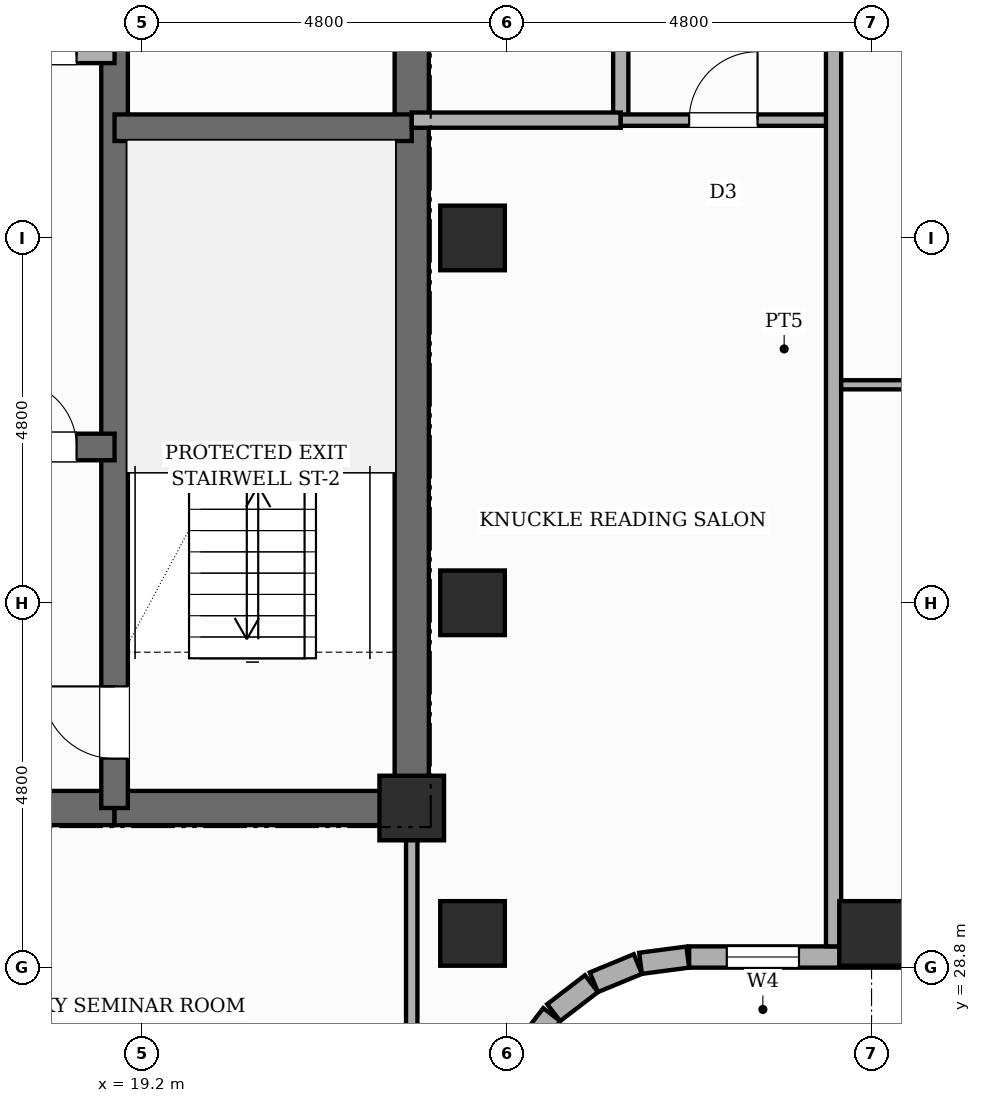
"""IFC4 building model, lengths in metres.
Left out: names, types, materials, properties, quantities, classifications, styles, units other than length and angle.
Written with IfcOpenShell. Run it as: python <this file> out.ifc"""

import sys

from ifc_helpers import new_model, si_unit, direction, frame, frame_2d, origin, origin_2d, place, context, subcontext, project, spatial, rectangle, extrude, element, fill, save


model = new_model("IFC4")
c1 = context("Model", 3, precision=1e-05, world=origin(), true_north=direction((0.0, 1.0)))
c2 = subcontext(c1, "Body", "Model", "MODEL_VIEW")
j1 = project(units=[si_unit("LENGTHUNIT", "METRE"), si_unit("PLANEANGLEUNIT", "RADIAN")], contexts=[c1])
p1 = place(None, origin())
s1 = spatial("IfcSite", under=j1, at=p1, CompositionType="ELEMENT")
p2 = place(p1, origin())
s2 = spatial("IfcBuilding", under=s1, at=p2, CompositionType="ELEMENT")
p3 = place(p2, frame((0.0, 0.0, 236.2)))
s3 = spatial("IfcBuildingStorey", under=s2, at=p3, CompositionType="ELEMENT", Elevation=236.2)
p4 = place(p3, frame((22.75, 30.675, 0.0), z_axis=(0.0, 0.0, 1.0), x_axis=(0.0, 1.0, 0.0)))
e1 = element("IfcWall", 1, at=p4, inside=s3, PredefinedType="SHEAR", context=c2, shape_type="SweptSolid", body=[
    extrude(rectangle(XDim=15.35, YDim=0.45, at=frame_2d((7.675, 0.0))), origin(), (0.0, 0.0, 1.0), 3.6),
])
p5 = place(p4, frame((10.675, 0.0, 0.0)))
e2 = element("IfcOpeningElement", 2, at=p5, cuts=e1, PredefinedType="OPENING", context=c2, shape_type="SweptSolid", body=[
    extrude(rectangle(XDim=1.0, YDim=2.15, at=frame_2d((0.5, 1.075))), frame((0.0, 0.235, 0.0), z_axis=(0.0, -1.0, 0.0), x_axis=(1.0, 0.0, 0.0)), (0.0, 0.0, 1.0), 0.47),
])
p6 = place(p3, frame((9.96, 30.9, 0.0), z_axis=(0.0, 0.0, 1.0), x_axis=(1.0, 0.0, 0.0)))
e3 = element("IfcWall", 3, at=p6, inside=s3, PredefinedType="SHEAR", context=c2, shape_type="SweptSolid", body=[
    extrude(rectangle(XDim=8.88, YDim=0.45, at=frame_2d((4.44, 0.0))), origin(), (0.0, 0.0, 1.0), 3.6),
])
p7 = place(p6, frame((4.09, 0.0, 0.0)))
e4 = element("IfcOpeningElement", 4, at=p7, cuts=e3, PredefinedType="OPENING", context=c2, shape_type="SweptSolid", body=[
    extrude(rectangle(XDim=1.0, YDim=2.15, at=frame_2d((0.5, 1.075))), frame((0.0, 0.235, 0.0), z_axis=(0.0, -1.0, 0.0), x_axis=(1.0, 0.0, 0.0)), (0.0, 0.0, 1.0), 0.47),
])
p8 = place(p3, frame((18.84, 30.9, 0.0), z_axis=(0.0, 0.0, 1.0), x_axis=(1.0, 0.0, 0.0)))
e5 = element("IfcWall", 5, at=p8, inside=s3, PredefinedType="SHEAR", context=c2, shape_type="SweptSolid", body=[
    extrude(rectangle(XDim=3.91, YDim=0.45, at=frame_2d((1.955, 0.0))), origin(), (0.0, 0.0, 1.0), 3.6),
])
p9 = place(p3, frame((18.84, 30.9, 0.0), z_axis=(0.0, 0.0, 1.0), x_axis=(0.0, 1.0, 0.0)))
e6 = element("IfcWall", 6, at=p9, inside=s3, PredefinedType="SHEAR", context=c2, shape_type="SweptSolid", body=[
    extrude(rectangle(XDim=14.9, YDim=0.35, at=frame_2d((7.45, 0.0))), origin(), (0.0, 0.0, 1.0), 3.6),
])
p10 = place(p9, frame((0.65, 0.0, 0.0)))
e7 = element("IfcOpeningElement", 7, at=p10, cuts=e6, PredefinedType="OPENING", context=c2, shape_type="SweptSolid", body=[
    extrude(rectangle(XDim=0.95, YDim=2.1, at=frame_2d((0.475, 1.05))), frame((0.0, 0.185, 0.0), z_axis=(0.0, -1.0, 0.0), x_axis=(1.0, 0.0, 0.0)), (0.0, 0.0, 1.0), 0.37),
])
p11 = place(p9, frame((10.45, 0.0, 0.0)))
e8 = element("IfcOpeningElement", 8, at=p11, cuts=e6, PredefinedType="OPENING", context=c2, shape_type="SweptSolid", body=[
    extrude(rectangle(XDim=1.0, YDim=2.15, at=frame_2d((0.5, 1.075))), frame((0.0, 0.185, 0.0), z_axis=(0.0, -1.0, 0.0), x_axis=(1.0, 0.0, 0.0)), (0.0, 0.0, 1.0), 0.37),
])
p12 = place(p3, frame((18.84, 39.85, 0.0), z_axis=(0.0, 0.0, 1.0), x_axis=(1.0, 0.0, 0.0)))
e9 = element("IfcWall", 9, at=p12, inside=s3, PredefinedType="SHEAR", context=c2, shape_type="SweptSolid", body=[
    extrude(rectangle(XDim=3.91, YDim=0.35, at=frame_2d((1.955, 0.0))), origin(), (0.0, 0.0, 1.0), 3.6),
])
p13 = place(p3, frame((9.96, 35.65, 0.0), z_axis=(0.0, 0.0, 1.0), x_axis=(1.0, 0.0, 0.0)))
e10 = element("IfcWall", 10, at=p13, inside=s3, PredefinedType="SHEAR", context=c2, shape_type="SweptSolid", body=[
    extrude(rectangle(XDim=8.88, YDim=0.35, at=frame_2d((4.44, 0.0))), origin(), (0.0, 0.0, 1.0), 3.6),
])
p14 = place(p13, frame((0.84, 0.0, 0.0)))
e11 = element("IfcOpeningElement", 11, at=p14, cuts=e10, PredefinedType="OPENING", context=c2, shape_type="SweptSolid", body=[
    extrude(rectangle(XDim=1.1, YDim=2.15, at=frame_2d((0.55, 1.075))), frame((0.0, 0.185, 0.0), z_axis=(0.0, -1.0, 0.0), x_axis=(1.0, 0.0, 0.0)), (0.0, 0.0, 1.0), 0.37),
])
p15 = place(p13, frame((5.24, 0.0, 0.0)))
e12 = element("IfcOpeningElement", 12, at=p15, cuts=e10, PredefinedType="OPENING", context=c2, shape_type="SweptSolid", body=[
    extrude(rectangle(XDim=1.1, YDim=2.15, at=frame_2d((0.55, 1.075))), frame((0.0, 0.185, 0.0), z_axis=(0.0, -1.0, 0.0), x_axis=(1.0, 0.0, 0.0)), (0.0, 0.0, 1.0), 0.37),
])
p16 = place(p13, frame((7.5, 0.0, 0.0)))
e13 = element("IfcOpeningElement", 13, at=p16, cuts=e10, PredefinedType="OPENING", context=c2, shape_type="SweptSolid", body=[
    extrude(rectangle(XDim=0.88, YDim=2.1, at=frame_2d((0.44, 1.05))), frame((0.0, 0.185, 0.0), z_axis=(0.0, -1.0, 0.0), x_axis=(1.0, 0.0, 0.0)), (0.0, 0.0, 1.0), 0.37),
])
for number, where, z_axis, x_axis in (
    (14, (22.75, 30.9, 0.0), (0.0, 0.0, 1.0), (1.0, 0.0, 0.0)),
    (15, (23.55, 29.25, 0.0), (0.0, 0.0, 1.0), (1.0, 0.0, 0.0)),
    (16, (23.55, 33.6, 0.0), (0.0, 0.0, 1.0), (1.0, 0.0, 0.0)),
    (17, (23.55, 38.4, 0.0), (0.0, 0.0, 1.0), (1.0, 0.0, 0.0)),
    (18, (28.8, 29.25, 0.0), (0.0, 0.0, 1.0), (1.0, 0.0, 0.0)),
):
    element("IfcColumn", number, at=place(p3, frame(where, z_axis=z_axis, x_axis=x_axis)), inside=s3, PredefinedType="COLUMN", context=c2, shape_type="SweptSolid", body=[
        extrude(rectangle(XDim=0.85, YDim=0.85, at=origin_2d()), origin(), (0.0, 0.0, 1.0), 3.6),
    ])
p17 = place(p3, frame((50.4, 28.94, 0.0), z_axis=(0.0, 0.0, 1.0), x_axis=(-1.0, 0.0, 0.0)))
e19 = element("IfcWall", 19, at=p17, inside=s3, PredefinedType="STANDARD", context=c2, shape_type="SweptSolid", body=[
    extrude(rectangle(XDim=24.0, YDim=0.28, at=frame_2d((12.0, 0.0))), origin(), (0.0, 0.0, 1.0), 2.6),
])
p18 = place(p17, frame((9.438, 0.0, 0.65)))
e20 = element("IfcOpeningElement", 20, at=p18, cuts=e19, PredefinedType="OPENING", context=c2, shape_type="SweptSolid", body=[
    extrude(rectangle(XDim=1.4, YDim=1.1, at=frame_2d((0.7, 0.55))), frame((0.0, 0.15, 0.0), z_axis=(0.0, -1.0, 0.0), x_axis=(1.0, 0.0, 0.0)), (0.0, 0.0, 1.0), 0.3),
])
p19 = place(p17, frame((22.555, 0.0, 0.45)))
e21 = element("IfcOpeningElement", 21, at=p19, cuts=e19, PredefinedType="OPENING", context=c2, shape_type="SweptSolid", body=[
    extrude(rectangle(XDim=0.95, YDim=1.8, at=frame_2d((0.475, 0.9))), frame((0.0, 0.15, 0.0), z_axis=(0.0, -1.0, 0.0), x_axis=(1.0, 0.0, 0.0)), (0.0, 0.0, 1.0), 0.3),
])
p20 = place(p17, frame((4.1, 0.0, 0.65)))
e22 = element("IfcOpeningElement", 22, at=p20, cuts=e19, PredefinedType="OPENING", context=c2, shape_type="SweptSolid", body=[
    extrude(rectangle(XDim=1.4, YDim=1.1, at=frame_2d((0.7, 0.55))), frame((0.0, 0.15, 0.0), z_axis=(0.0, -1.0, 0.0), x_axis=(1.0, 0.0, 0.0)), (0.0, 0.0, 1.0), 0.3),
])
p21 = place(p17, frame((15.138, 0.0, 0.45)))
e23 = element("IfcOpeningElement", 23, at=p21, cuts=e19, PredefinedType="OPENING", context=c2, shape_type="SweptSolid", body=[
    extrude(rectangle(XDim=0.95, YDim=1.8, at=frame_2d((0.475, 0.9))), frame((0.0, 0.15, 0.0), z_axis=(0.0, -1.0, 0.0), x_axis=(1.0, 0.0, 0.0)), (0.0, 0.0, 1.0), 0.3),
])
p22 = place(p17, frame((0.681, 0.0, 0.45)))
e24 = element("IfcOpeningElement", 24, at=p22, cuts=e19, PredefinedType="OPENING", context=c2, shape_type="SweptSolid", body=[
    extrude(rectangle(XDim=0.95, YDim=1.8, at=frame_2d((0.475, 0.9))), frame((0.0, 0.15, 0.0), z_axis=(0.0, -1.0, 0.0), x_axis=(1.0, 0.0, 0.0)), (0.0, 0.0, 1.0), 0.3),
])
p23 = place(p3, frame((26.382, 28.939, 0.0), z_axis=(0.0, 0.0, 1.0), x_axis=(-0.9914410257, -0.130555323746, 0.0)))
e25 = element("IfcWall", 25, at=p23, inside=s3, PredefinedType="STANDARD", context=c2, shape_type="SweptSolid", body=[
    extrude(rectangle(XDim=0.626, YDim=0.28, at=frame_2d((0.313, 0.0))), origin(), (0.0, 0.0, 1.0), 3.32),
])
p24 = place(p3, frame((25.725, 28.847, 0.0), z_axis=(0.0, 0.0, 1.0), x_axis=(-0.923974080304, -0.382455093999, 0.0)))
e26 = element("IfcWall", 26, at=p24, inside=s3, PredefinedType="STANDARD", context=c2, shape_type="SweptSolid", body=[
    extrude(rectangle(XDim=0.626, YDim=0.28, at=frame_2d((0.313, 0.0))), origin(), (0.0, 0.0, 1.0), 3.32),
])
for number, where, z_axis, x_axis in (
    (27, (25.115, 28.59, 0.0), (0.0, 0.0, 1.0), (-0.793, -0.609, 0.0)),
    (28, (24.592, 28.182, 0.0), (0.0, 0.0, 1.0), (-0.609, -0.793, 0.0)),
):
    element("IfcWall", number, at=place(p3, frame(where, z_axis=z_axis, x_axis=x_axis)), inside=s3, PredefinedType="STANDARD", context=c2, shape_type="SweptSolid", body=[
        extrude(rectangle(XDim=0.626, YDim=0.28, at=frame_2d((0.313, 0.0))), origin(), (0.0, 0.0, 1.0), 3.32),
    ])
p25 = place(p3, frame((9.96, 40.8, 0.0), z_axis=(0.0, 0.0, 1.0), x_axis=(1.0, 0.0, 0.0)))
e29 = element("IfcWall", 29, at=p25, inside=s3, PredefinedType="POLYGONAL", context=c2, shape_type="SweptSolid", body=[
    extrude(rectangle(XDim=8.88, YDim=0.2, at=frame_2d((4.44, 0.0))), origin(), (0.0, 0.0, 1.0), 3.32),
])
p26 = place(p25, frame((7.5, 0.0, 0.0)))
e30 = element("IfcOpeningElement", 30, at=p26, cuts=e29, PredefinedType="OPENING", context=c2, shape_type="SweptSolid", body=[
    extrude(rectangle(XDim=0.88, YDim=2.1, at=frame_2d((0.44, 1.05))), frame((0.0, 0.11, 0.0), z_axis=(0.0, -1.0, 0.0), x_axis=(1.0, 0.0, 0.0)), (0.0, 0.0, 1.0), 0.22),
])
p27 = place(p25, frame((1.0, 0.0, 0.0)))
e31 = element("IfcOpeningElement", 31, at=p27, cuts=e29, PredefinedType="OPENING", context=c2, shape_type="SweptSolid", body=[
    extrude(rectangle(XDim=0.88, YDim=2.1, at=frame_2d((0.44, 1.05))), frame((0.0, 0.11, 0.0), z_axis=(0.0, -1.0, 0.0), x_axis=(1.0, 0.0, 0.0)), (0.0, 0.0, 1.0), 0.22),
])
p28 = place(p25, frame((3.4, 0.0, 0.0)))
e32 = element("IfcOpeningElement", 32, at=p28, cuts=e29, PredefinedType="OPENING", context=c2, shape_type="SweptSolid", body=[
    extrude(rectangle(XDim=0.88, YDim=2.1, at=frame_2d((0.44, 1.05))), frame((0.0, 0.11, 0.0), z_axis=(0.0, -1.0, 0.0), x_axis=(1.0, 0.0, 0.0)), (0.0, 0.0, 1.0), 0.22),
])
p29 = place(p25, frame((5.55, 0.0, 0.0)))
e33 = element("IfcOpeningElement", 33, at=p29, cuts=e29, PredefinedType="OPENING", context=c2, shape_type="SweptSolid", body=[
    extrude(rectangle(XDim=0.88, YDim=2.1, at=frame_2d((0.44, 1.05))), frame((0.0, 0.11, 0.0), z_axis=(0.0, -1.0, 0.0), x_axis=(1.0, 0.0, 0.0)), (0.0, 0.0, 1.0), 0.22),
])
p30 = place(p3, frame((22.75, 25.75, 0.0), z_axis=(0.0, 0.0, 1.0), x_axis=(0.0, 1.0, 0.0)))
e34 = element("IfcWall", 34, at=p30, inside=s3, PredefinedType="PARTITIONING", context=c2, shape_type="SweptSolid", body=[
    extrude(rectangle(XDim=5.15, YDim=0.15, at=frame_2d((2.575, 0.0))), origin(), (0.0, 0.0, 1.0), 3.32),
])
p31 = place(p3, frame((25.5, 39.95, 0.0), z_axis=(0.0, 0.0, 1.0), x_axis=(0.0, 1.0, 0.0)))
e35 = element("IfcWall", 35, at=p31, inside=s3, PredefinedType="PARTITIONING", context=c2, shape_type="SweptSolid", body=[
    extrude(rectangle(XDim=4.85, YDim=0.2, at=frame_2d((2.425, 0.0))), origin(), (0.0, 0.0, 1.0), 3.32),
])
p32 = place(p3, frame((22.75, 39.95, 0.0), z_axis=(0.0, 0.0, 1.0), x_axis=(1.0, 0.0, 0.0)))
e36 = element("IfcWall", 36, at=p32, inside=s3, PredefinedType="PARTITIONING", context=c2, shape_type="SweptSolid", body=[
    extrude(rectangle(XDim=2.75, YDim=0.2, at=frame_2d((1.375, 0.0))), origin(), (0.0, 0.0, 1.0), 3.32),
])
p33 = place(p3, frame((25.5, 39.95, 0.0), z_axis=(0.0, 0.0, 1.0), x_axis=(1.0, 0.0, 0.0)))
e37 = element("IfcWall", 37, at=p33, inside=s3, PredefinedType="PARTITIONING", context=c2, shape_type="SweptSolid", body=[
    extrude(rectangle(XDim=2.8, YDim=0.15, at=frame_2d((1.4, 0.0))), origin(), (0.0, 0.0, 1.0), 3.32),
])
p34 = place(p33, frame((0.9, 0.0, 0.0)))
e38 = element("IfcOpeningElement", 38, at=p34, cuts=e37, PredefinedType="OPENING", context=c2, shape_type="SweptSolid", body=[
    extrude(rectangle(XDim=0.9, YDim=2.15, at=frame_2d((0.45, 1.075))), frame((0.0, 0.085, 0.0), z_axis=(0.0, -1.0, 0.0), x_axis=(1.0, 0.0, 0.0)), (0.0, 0.0, 1.0), 0.17),
])
p35 = place(p3, frame((28.3, 29.08, 0.0), z_axis=(0.0, 0.0, 1.0), x_axis=(0.0, 1.0, 0.0)))
e39 = element("IfcWall", 39, at=p35, inside=s3, PredefinedType="SOLIDWALL", context=c2, shape_type="SweptSolid", body=[
    extrude(rectangle(XDim=15.72, YDim=0.2, at=frame_2d((7.86, 0.0))), origin(), (0.0, 0.0, 1.0), 3.32),
])
p36 = place(p3, frame((28.4, 36.468, 0.0), z_axis=(0.0, 0.0, 1.0), x_axis=(1.0, 0.0, 0.0)))
e40 = element("IfcWall", 40, at=p36, inside=s3, PredefinedType="PARTITIONING", context=c2, shape_type="SweptSolid", body=[
    extrude(rectangle(XDim=7.128, YDim=0.12, at=frame_2d((3.564, 0.0))), origin(), (0.0, 0.0, 1.0), 3.32),
])
p37 = place(p36, frame((2.767, 0.0, 0.0)))
e41 = element("IfcOpeningElement", 41, at=p37, cuts=e40, PredefinedType="OPENING", context=c2, shape_type="SweptSolid", body=[
    extrude(rectangle(XDim=0.9, YDim=2.15, at=frame_2d((0.45, 1.075))), frame((0.0, 0.07, 0.0), z_axis=(0.0, -1.0, 0.0), x_axis=(1.0, 0.0, 0.0)), (0.0, 0.0, 1.0), 0.14),
])
p38 = place(p19, origin())
e42 = element("IfcWindow", 42, at=p38, inside=s3, PartitioningType="SINGLE_PANEL", PredefinedType="WINDOW", context=c2, shape_type="SweptSolid", body=[
    extrude(rectangle(XDim=0.95, YDim=1.8, at=frame_2d((0.475, 0.9))), frame((0.0, 0.03, 0.0), z_axis=(0.0, -1.0, 0.0), x_axis=(1.0, 0.0, 0.0)), (0.0, 0.0, 1.0), 0.06),
])
fill(e21, e42)
p39 = place(p10, origin())
e43 = element("IfcDoor", 43, at=p39, inside=s3, OperationType="SINGLE_SWING_RIGHT", PredefinedType="DOOR", context=c2, shape_type="SweptSolid", body=[
    extrude(rectangle(XDim=0.95, YDim=2.1, at=frame_2d((0.475, 1.05))), frame((0.0, 0.025, 0.0), z_axis=(0.0, -1.0, 0.0), x_axis=(1.0, 0.0, 0.0)), (0.0, 0.0, 1.0), 0.05),
])
fill(e7, e43)
p40 = place(p16, origin())
e44 = element("IfcDoor", 44, at=p40, inside=s3, OperationType="SINGLE_SWING_LEFT", PredefinedType="DOOR", context=c2, shape_type="SweptSolid", body=[
    extrude(rectangle(XDim=0.88, YDim=2.1, at=frame_2d((0.44, 1.05))), frame((0.0, 0.025, 0.0), z_axis=(0.0, -1.0, 0.0), x_axis=(1.0, 0.0, 0.0)), (0.0, 0.0, 1.0), 0.05),
])
fill(e13, e44)
p41 = place(p26, origin())
e45 = element("IfcDoor", 45, at=p41, inside=s3, OperationType="SINGLE_SWING_RIGHT", PredefinedType="DOOR", context=c2, shape_type="SweptSolid", body=[
    extrude(rectangle(XDim=0.88, YDim=2.1, at=frame_2d((0.44, 1.05))), frame((0.0, 0.025, 0.0), z_axis=(0.0, -1.0, 0.0), x_axis=(1.0, 0.0, 0.0)), (0.0, 0.0, 1.0), 0.05),
])
fill(e30, e45)
p42 = place(p34, origin())
e46 = element("IfcDoor", 46, at=p42, inside=s3, OperationType="SINGLE_SWING_RIGHT", PredefinedType="DOOR", context=c2, shape_type="SweptSolid", body=[
    extrude(rectangle(XDim=0.9, YDim=2.15, at=frame_2d((0.45, 1.075))), frame((0.0, 0.025, 0.0), z_axis=(0.0, -1.0, 0.0), x_axis=(1.0, 0.0, 0.0)), (0.0, 0.0, 1.0), 0.05),
])
fill(e38, e46)
save(model, sys.argv[1])
